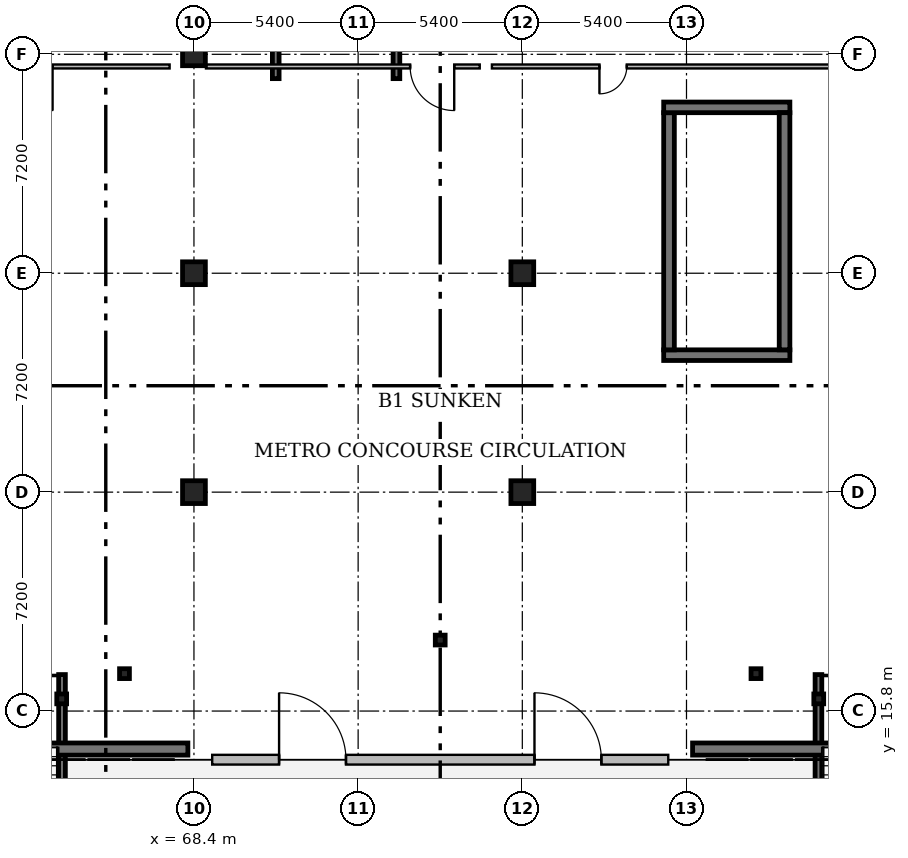
"""IFC4 building model, lengths in metres.
Left out: names, types, materials, properties, quantities, classifications, styles, units other than length and angle.
Written with IfcOpenShell. Run it as: python <this file> out.ifc"""

import sys

from ifc_helpers import new_model, si_unit, direction, frame, frame_2d, origin, origin_2d, place, context, subcontext, project, spatial, rectangle, circle, hollow_circle, extrude, element, fill, save


model = new_model("IFC4")
c1 = context("Model", 3, precision=1e-05, world=origin(), true_north=direction((0.0, 1.0)))
c2 = subcontext(c1, "Body", "Model", "MODEL_VIEW")
j1 = project(units=[si_unit("LENGTHUNIT", "METRE"), si_unit("PLANEANGLEUNIT", "RADIAN")], contexts=[c1])
p1 = place(None, origin())
s1 = spatial("IfcSite", under=j1, at=p1, CompositionType="ELEMENT")
p2 = place(p1, origin())
s2 = spatial("IfcBuilding", under=s1, at=p2, CompositionType="ELEMENT")
p3 = place(p2, frame((0.0, 0.0, -4.8)))
s3 = spatial("IfcBuildingStorey", under=s2, at=p3, CompositionType="ELEMENT", Elevation=-4.8)
for number, where, z_axis, x_axis in (
    (1, (68.4, 23.0, 0.0), (0.0, 0.0, 1.0), (1.0, 0.0, 0.0)),
    (2, (68.4, 30.2, 0.0), (0.0, 0.0, 1.0), (1.0, 0.0, 0.0)),
    (3, (68.4, 37.4, 0.0), (0.0, 0.0, 1.0), (1.0, 0.0, 0.0)),
    (4, (79.2, 23.0, 0.0), (0.0, 0.0, 1.0), (1.0, 0.0, 0.0)),
    (5, (79.2, 30.2, 0.0), (0.0, 0.0, 1.0), (1.0, 0.0, 0.0)),
):
    element("IfcColumn", number, at=place(p3, frame(where, z_axis=z_axis, x_axis=x_axis)), inside=s3, PredefinedType="COLUMN", context=c2, shape_type="SweptSolid", body=[
        extrude(circle(Radius=0.375, at=origin_2d()), origin(), (0.0, 0.0, 1.0), 4.8),
    ])
for number, where, z_axis, x_axis in (
    (6, (64.05, 16.2, 0.0), (0.0, 0.0, 1.0), (1.0, 0.0, 0.0)),
    (7, (88.95, 16.2, 0.0), (0.0, 0.0, 1.0), (1.0, 0.0, 0.0)),
):
    element("IfcColumn", number, at=place(p3, frame(where, z_axis=z_axis, x_axis=x_axis)), inside=s3, PredefinedType="COLUMN", context=c2, shape_type="SweptSolid", body=[
        extrude(hollow_circle(Radius=0.162, WallThickness=0.012, at=origin_2d()), origin(), (0.0, 0.0, 1.0), 4.8),
    ])
p4 = place(p3, frame((88.0, 27.505, 0.0), z_axis=(0.0, 0.0, 1.0), x_axis=(-1.0, 0.0, 0.0)))
e8 = element("IfcWall", 8, at=p4, inside=s3, PredefinedType="SOLIDWALL", context=c2, shape_type="SweptSolid", body=[
    extrude(rectangle(XDim=4.15, YDim=0.35, at=frame_2d((2.075, 0.0))), origin(), (0.0, 0.0, 1.0), 4.54),
])
p5 = place(p3, frame((84.025, 27.68, 0.0), z_axis=(0.0, 0.0, 1.0), x_axis=(0.0, 1.0, 0.0)))
e9 = element("IfcWall", 9, at=p5, inside=s3, PredefinedType="SOLIDWALL", context=c2, shape_type="SweptSolid", body=[
    extrude(rectangle(XDim=7.8, YDim=0.35, at=frame_2d((3.9, 0.0))), origin(), (0.0, 0.0, 1.0), 4.54),
])
p6 = place(p3, frame((83.85, 35.655, 0.0), z_axis=(0.0, 0.0, 1.0), x_axis=(1.0, 0.0, 0.0)))
e10 = element("IfcWall", 10, at=p6, inside=s3, PredefinedType="SOLIDWALL", context=c2, shape_type="SweptSolid", body=[
    extrude(rectangle(XDim=4.15, YDim=0.35, at=frame_2d((2.075, 0.0))), origin(), (0.0, 0.0, 1.0), 4.54),
])
p7 = place(p3, frame((87.825, 35.48, 0.0), z_axis=(0.0, 0.0, 1.0), x_axis=(0.0, -1.0, 0.0)))
e11 = element("IfcWall", 11, at=p7, inside=s3, PredefinedType="SOLIDWALL", context=c2, shape_type="SweptSolid", body=[
    extrude(rectangle(XDim=7.8, YDim=0.35, at=frame_2d((3.9, 0.0))), origin(), (0.0, 0.0, 1.0), 4.54),
])
for number, where, z_axis, x_axis in (
    (12, (64.06, 9.015, 0.0), (0.0, 0.0, 1.0), (0.0, 1.0, 0.0)),
    (13, (88.94, 9.015, 0.0), (0.0, 0.0, 1.0), (0.0, 1.0, 0.0)),
):
    element("IfcWall", number, at=place(p3, frame(where, z_axis=z_axis, x_axis=x_axis)), inside=s3, PredefinedType="SOLIDWALL", context=c2, shape_type="SweptSolid", body=[
        extrude(rectangle(XDim=7.985, YDim=0.22, at=frame_2d((3.993, 0.0))), origin(), (0.0, 0.0, 1.0), 4.8),
    ])
for number, where, z_axis, x_axis in (
    (14, (71.09, 36.6, 0.0), (0.0, 0.0, 1.0), (0.0, 1.0, 0.0)),
    (15, (75.06, 36.6, 0.0), (0.0, 0.0, 1.0), (0.0, 1.0, 0.0)),
):
    element("IfcWall", number, at=place(p3, frame(where, z_axis=z_axis, x_axis=x_axis)), inside=s3, PredefinedType="SOLIDWALL", context=c2, shape_type="SweptSolid", body=[
        extrude(rectangle(XDim=7.6, YDim=0.22, at=frame_2d((3.8, 0.0))), origin(), (0.0, 0.0, 1.0), 4.52),
    ])
for number, where, z_axis, x_axis in (
    (16, (57.6, 14.55, 0.0), (0.0, 0.0, 1.0), (1.0, 0.0, 0.0)),
    (17, (84.8, 14.55, 0.0), (0.0, 0.0, 1.0), (1.0, 0.0, 0.0)),
):
    element("IfcWall", number, at=place(p3, frame(where, z_axis=z_axis, x_axis=x_axis)), inside=s3, PredefinedType="SOLIDWALL", context=c2, shape_type="SweptSolid", body=[
        extrude(rectangle(XDim=10.6, YDim=0.4, at=frame_2d((5.3, 0.0))), origin(), (0.0, 0.0, 1.0), 4.63),
    ])
p8 = place(p3, frame((69.0, 14.2, 0.0), z_axis=(0.0, 0.0, 1.0), x_axis=(1.0, 0.0, 0.0)))
e18 = element("IfcWall", 18, at=p8, inside=s3, PredefinedType="SOLIDWALL", context=c2, shape_type="SweptSolid", body=[
    extrude(rectangle(XDim=15.0, YDim=0.32, at=frame_2d((7.5, 0.0))), origin(), (0.0, 0.0, 1.0), 4.35),
])
p9 = place(p8, frame((2.2, 0.0, 0.0)))
e19 = element("IfcOpeningElement", 19, at=p9, cuts=e18, PredefinedType="OPENING", context=c2, shape_type="SweptSolid", body=[
    extrude(rectangle(XDim=2.2, YDim=2.5, at=frame_2d((1.1, 1.25))), frame((0.0, 0.18, 0.0), z_axis=(0.0, -1.0, 0.0), x_axis=(1.0, 0.0, 0.0)), (0.0, 0.0, 1.0), 0.36),
])
p10 = place(p8, frame((10.6, 0.0, 0.0)))
e20 = element("IfcOpeningElement", 20, at=p10, cuts=e18, PredefinedType="OPENING", context=c2, shape_type="SweptSolid", body=[
    extrude(rectangle(XDim=2.2, YDim=2.5, at=frame_2d((1.1, 1.25))), frame((0.0, 0.18, 0.0), z_axis=(0.0, -1.0, 0.0), x_axis=(1.0, 0.0, 0.0)), (0.0, 0.0, 1.0), 0.36),
])
for number, where, z_axis, x_axis in (
    (21, (66.115, 17.03, 0.0), (0.0, 0.0, 1.0), (1.0, 0.0, 0.0)),
    (22, (76.5, 18.135, 0.0), (0.0, 0.0, 1.0), (1.0, 0.0, 0.0)),
    (23, (86.885, 17.03, 0.0), (0.0, 0.0, 1.0), (1.0, 0.0, 0.0)),
):
    element("IfcColumn", number, at=place(p3, frame(where, z_axis=z_axis, x_axis=x_axis)), inside=s3, PredefinedType="COLUMN", context=c2, shape_type="SweptSolid", body=[
        extrude(hollow_circle(Radius=0.162, WallThickness=0.012, at=origin_2d()), origin(), (0.0, 0.0, 1.0), 4.8),
    ])
p11 = place(p3, frame((67.6, 37.0, 0.0), z_axis=(0.0, 0.0, 1.0), x_axis=(-1.0, 0.0, 0.0)))
e24 = element("IfcWall", 24, at=p11, inside=s3, PredefinedType="PARTITIONING", context=c2, shape_type="SweptSolid", body=[
    extrude(rectangle(XDim=9.4, YDim=0.13, at=frame_2d((4.7, 0.0))), origin(), (0.0, 0.0, 1.0), 3.51),
])
p12 = place(p11, frame((3.85, 0.0, 0.0)))
e25 = element("IfcOpeningElement", 25, at=p12, cuts=e24, PredefinedType="OPENING", context=c2, shape_type="SweptSolid", body=[
    extrude(rectangle(XDim=1.45, YDim=2.2, at=frame_2d((0.725, 1.1))), frame((0.0, 0.085, 0.0), z_axis=(0.0, -1.0, 0.0), x_axis=(1.0, 0.0, 0.0)), (0.0, 0.0, 1.0), 0.17),
])
p13 = place(p3, frame((89.605, 37.0, 0.0), z_axis=(0.0, 0.0, 1.0), x_axis=(-1.0, 0.0, 0.0)))
e26 = element("IfcWall", 26, at=p13, inside=s3, PredefinedType="PARTITIONING", context=c2, shape_type="SweptSolid", body=[
    extrude(rectangle(XDim=11.405, YDim=0.13, at=frame_2d((5.703, 0.0))), origin(), (0.0, 0.0, 1.0), 4.54),
])
p14 = place(p13, frame((6.969, 0.0, 0.0)))
e27 = element("IfcOpeningElement", 27, at=p14, cuts=e26, PredefinedType="OPENING", context=c2, shape_type="SweptSolid", body=[
    extrude(rectangle(XDim=0.9, YDim=2.15, at=frame_2d((0.45, 1.075))), frame((0.0, 0.085, 0.0), z_axis=(0.0, -1.0, 0.0), x_axis=(1.0, 0.0, 0.0)), (0.0, 0.0, 1.0), 0.17),
])
p15 = place(p3, frame((77.8, 37.0, 0.0), z_axis=(0.0, 0.0, 1.0), x_axis=(-1.0, 0.0, 0.0)))
e28 = element("IfcWall", 28, at=p15, inside=s3, PredefinedType="PARTITIONING", context=c2, shape_type="SweptSolid", body=[
    extrude(rectangle(XDim=9.005, YDim=0.13, at=frame_2d((4.502, 0.0))), origin(), (0.0, 0.0, 1.0), 4.54),
])
p16 = place(p15, frame((0.84, 0.0, 0.0)))
e29 = element("IfcOpeningElement", 29, at=p16, cuts=e28, PredefinedType="OPENING", context=c2, shape_type="SweptSolid", body=[
    extrude(rectangle(XDim=1.45, YDim=2.2, at=frame_2d((0.725, 1.1))), frame((0.0, 0.085, 0.0), z_axis=(0.0, -1.0, 0.0), x_axis=(1.0, 0.0, 0.0)), (0.0, 0.0, 1.0), 0.17),
])
p17 = place(p9, origin())
e30 = element("IfcDoor", 30, at=p17, inside=s3, OperationType="SINGLE_SWING_LEFT", PredefinedType="DOOR", context=c2, shape_type="SweptSolid", body=[
    extrude(rectangle(XDim=2.2, YDim=2.5, at=frame_2d((1.1, 1.25))), frame((0.0, 0.025, 0.0), z_axis=(0.0, -1.0, 0.0), x_axis=(1.0, 0.0, 0.0)), (0.0, 0.0, 1.0), 0.05),
])
fill(e19, e30)
p18 = place(p10, origin())
e31 = element("IfcDoor", 31, at=p18, inside=s3, OperationType="SINGLE_SWING_LEFT", PredefinedType="DOOR", context=c2, shape_type="SweptSolid", body=[
    extrude(rectangle(XDim=2.2, YDim=2.5, at=frame_2d((1.1, 1.25))), frame((0.0, 0.025, 0.0), z_axis=(0.0, -1.0, 0.0), x_axis=(1.0, 0.0, 0.0)), (0.0, 0.0, 1.0), 0.05),
])
fill(e20, e31)
p19 = place(p12, origin())
e32 = element("IfcDoor", 32, at=p19, inside=s3, OperationType="DOUBLE_DOOR_SINGLE_SWING", PredefinedType="DOOR", context=c2, shape_type="SweptSolid", body=[
    extrude(rectangle(XDim=1.45, YDim=2.2, at=frame_2d((0.725, 1.1))), frame((0.0, 0.025, 0.0), z_axis=(0.0, -1.0, 0.0), x_axis=(1.0, 0.0, 0.0)), (0.0, 0.0, 1.0), 0.05),
])
fill(e25, e32)
p20 = place(p14, origin())
e33 = element("IfcDoor", 33, at=p20, inside=s3, OperationType="SINGLE_SWING_RIGHT", PredefinedType="DOOR", context=c2, shape_type="SweptSolid", body=[
    extrude(rectangle(XDim=0.9, YDim=2.15, at=frame_2d((0.45, 1.075))), frame((0.0, 0.025, 0.0), z_axis=(0.0, -1.0, 0.0), x_axis=(1.0, 0.0, 0.0)), (0.0, 0.0, 1.0), 0.05),
])
fill(e27, e33)
p21 = place(p16, origin())
e34 = element("IfcDoor", 34, at=p21, inside=s3, OperationType="DOUBLE_DOOR_SINGLE_SWING", PredefinedType="DOOR", context=c2, shape_type="SweptSolid", body=[
    extrude(rectangle(XDim=1.45, YDim=2.2, at=frame_2d((0.725, 1.1))), frame((0.0, 0.025, 0.0), z_axis=(0.0, -1.0, 0.0), x_axis=(1.0, 0.0, 0.0)), (0.0, 0.0, 1.0), 0.05),
])
fill(e29, e34)
save(model, sys.argv[1])
